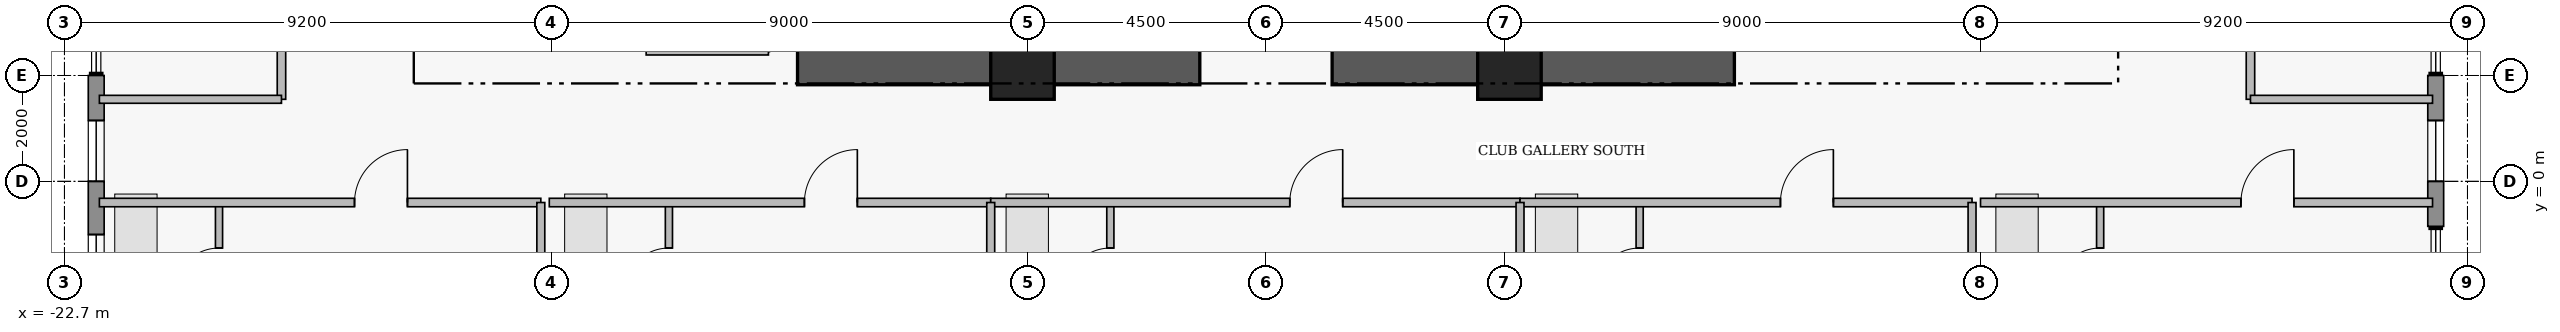
"""IFC4 building model, lengths in metres.
Left out: names, types, materials, properties, quantities, classifications, styles, units other than length and angle.
Written with IfcOpenShell. Run it as: python <this file> out.ifc"""

import sys

from ifc_helpers import new_model, si_unit, direction, frame, frame_2d, origin, origin_2d, place, context, subcontext, project, spatial, rectangle, extrude, element, fill, save


model = new_model("IFC4")
c1 = context("Model", 3, precision=1e-05, world=origin(), true_north=direction((0.0, 1.0)))
c2 = subcontext(c1, "Body", "Model", "MODEL_VIEW")
j1 = project(units=[si_unit("LENGTHUNIT", "METRE"), si_unit("PLANEANGLEUNIT", "RADIAN")], contexts=[c1])
p1 = place(None, origin())
s1 = spatial("IfcSite", under=j1, at=p1, CompositionType="ELEMENT")
p2 = place(p1, origin())
s2 = spatial("IfcBuilding", under=s1, at=p2, CompositionType="ELEMENT")
p3 = place(p2, frame((0.0, 0.0, 177.4)))
s3 = spatial("IfcBuildingStorey", under=s2, at=p3, CompositionType="ELEMENT", Elevation=177.4)
for number, where, z_axis, x_axis in (
    (1, (-8.85, 2.15, 0.0), (0.0, 0.0, 1.0), (1.0, 0.0, 0.0)),
    (2, (1.25, 2.15, 0.0), (0.0, 0.0, 1.0), (1.0, 0.0, 0.0)),
):
    element("IfcWall", number, at=place(p3, frame(where, z_axis=z_axis, x_axis=x_axis)), inside=s3, PredefinedType="SHEAR", context=c2, shape_type="SweptSolid", body=[
        extrude(rectangle(XDim=7.6, YDim=0.65, at=frame_2d((3.8, 0.0))), origin(), (0.0, 0.0, 1.0), 3.53),
    ])
for number, where, z_axis, x_axis in (
    (3, (-4.6, 2.15, 0.0), (0.0, 0.0, 1.0), (1.0, 0.0, 0.0)),
    (4, (4.6, 2.15, 0.0), (0.0, 0.0, 1.0), (1.0, 0.0, 0.0)),
):
    element("IfcColumn", number, at=place(p3, frame(where, z_axis=z_axis, x_axis=x_axis)), inside=s3, PredefinedType="COLUMN", context=c2, shape_type="SweptSolid", body=[
        extrude(rectangle(XDim=1.2, YDim=1.2, at=origin_2d()), origin(), (0.0, 0.0, 1.0), 3.75),
    ])
p4 = place(p3, frame((-22.1, -4.2, 0.0), z_axis=(0.0, 0.0, 1.0), x_axis=(0.0, 1.0, 0.0)))
e5 = element("IfcWall", 5, at=p4, inside=s3, PredefinedType="STANDARD", context=c2, shape_type="SweptSolid", body=[
    extrude(rectangle(XDim=6.2, YDim=0.3, at=frame_2d((3.1, 0.0))), origin(), (0.0, 0.0, 1.0), 3.53),
])
p5 = place(p4, frame((2.045, 0.0, 0.95)))
e6 = element("IfcOpeningElement", 6, at=p5, cuts=e5, PredefinedType="OPENING", context=c2, shape_type="SweptSolid", body=[
    extrude(rectangle(XDim=1.15, YDim=1.55, at=frame_2d((0.575, 0.775))), frame((0.0, 0.16, 0.0), z_axis=(0.0, -1.0, 0.0), x_axis=(1.0, 0.0, 0.0)), (0.0, 0.0, 1.0), 0.32),
])
p6 = place(p4, frame((4.2, 0.0, 0.95)))
e7 = element("IfcOpeningElement", 7, at=p6, cuts=e5, PredefinedType="OPENING", context=c2, shape_type="SweptSolid", body=[
    extrude(rectangle(XDim=1.15, YDim=1.55, at=frame_2d((0.575, 0.775))), frame((0.0, 0.16, 0.0), z_axis=(0.0, -1.0, 0.0), x_axis=(1.0, 0.0, 0.0)), (0.0, 0.0, 1.0), 0.32),
])
p7 = place(p3, frame((22.1, 2.0, 0.0), z_axis=(0.0, 0.0, 1.0), x_axis=(0.0, -1.0, 0.0)))
e8 = element("IfcWall", 8, at=p7, inside=s3, PredefinedType="STANDARD", context=c2, shape_type="SweptSolid", body=[
    extrude(rectangle(XDim=2.85, YDim=0.3, at=frame_2d((1.425, 0.0))), origin(), (0.0, 0.0, 1.0), 3.53),
])
p8 = place(p7, frame((0.85, 0.0, 0.95)))
e9 = element("IfcOpeningElement", 9, at=p8, cuts=e8, PredefinedType="OPENING", context=c2, shape_type="SweptSolid", body=[
    extrude(rectangle(XDim=1.15, YDim=1.55, at=frame_2d((0.575, 0.775))), frame((0.0, 0.16, 0.0), z_axis=(0.0, -1.0, 0.0), x_axis=(1.0, 0.0, 0.0)), (0.0, 0.0, 1.0), 0.32),
])
p9 = place(p3, frame((-19.78, -2.76, 0.0), z_axis=(0.0, 0.0, 1.0), x_axis=(0.0, 1.0, 0.0)))
e10 = element("IfcWall", 10, at=p9, inside=s3, PredefinedType="PLUMBINGWALL", context=c2, shape_type="SweptSolid", body=[
    extrude(rectangle(XDim=2.36, YDim=0.135, at=frame_2d((1.18, 0.0))), origin(), (0.0, 0.0, 1.0), 3.53),
])
p10 = place(p9, frame((0.65, 0.0, 0.0)))
e11 = element("IfcOpeningElement", 11, at=p10, cuts=e10, PredefinedType="OPENING", context=c2, shape_type="SweptSolid", body=[
    extrude(rectangle(XDim=0.85, YDim=2.1, at=frame_2d((0.425, 1.05))), frame((0.0, 0.077, 0.0), z_axis=(0.0, -1.0, 0.0), x_axis=(1.0, 0.0, 0.0)), (0.0, 0.0, 1.0), 0.155),
])
p11 = place(p3, frame((-22.04, -0.4, 0.0), z_axis=(0.0, 0.0, 1.0), x_axis=(1.0, 0.0, 0.0)))
e12 = element("IfcWall", 12, at=p11, inside=s3, PredefinedType="PARTITIONING", context=c2, shape_type="SweptSolid", body=[
    extrude(rectangle(XDim=8.34, YDim=0.16, at=frame_2d((4.17, 0.0))), origin(), (0.0, 0.0, 1.0), 3.53),
])
p12 = place(p11, frame((4.82, 0.0, 0.0)))
e13 = element("IfcOpeningElement", 13, at=p12, cuts=e12, PredefinedType="OPENING", context=c2, shape_type="SweptSolid", body=[
    extrude(rectangle(XDim=1.0, YDim=2.15, at=frame_2d((0.5, 1.075))), frame((0.0, 0.09, 0.0), z_axis=(0.0, -1.0, 0.0), x_axis=(1.0, 0.0, 0.0)), (0.0, 0.0, 1.0), 0.18),
])
p13 = place(p3, frame((-11.28, -2.76, 0.0), z_axis=(0.0, 0.0, 1.0), x_axis=(0.0, 1.0, 0.0)))
e14 = element("IfcWall", 14, at=p13, inside=s3, PredefinedType="PLUMBINGWALL", context=c2, shape_type="SweptSolid", body=[
    extrude(rectangle(XDim=2.36, YDim=0.135, at=frame_2d((1.18, 0.0))), origin(), (0.0, 0.0, 1.0), 3.53),
])
p14 = place(p13, frame((0.65, 0.0, 0.0)))
e15 = element("IfcOpeningElement", 15, at=p14, cuts=e14, PredefinedType="OPENING", context=c2, shape_type="SweptSolid", body=[
    extrude(rectangle(XDim=0.85, YDim=2.1, at=frame_2d((0.425, 1.05))), frame((0.0, 0.077, 0.0), z_axis=(0.0, -1.0, 0.0), x_axis=(1.0, 0.0, 0.0)), (0.0, 0.0, 1.0), 0.155),
])
p15 = place(p3, frame((-13.54, -0.4, 0.0), z_axis=(0.0, 0.0, 1.0), x_axis=(1.0, 0.0, 0.0)))
e16 = element("IfcWall", 16, at=p15, inside=s3, PredefinedType="PARTITIONING", context=c2, shape_type="SweptSolid", body=[
    extrude(rectangle(XDim=8.34, YDim=0.16, at=frame_2d((4.17, 0.0))), origin(), (0.0, 0.0, 1.0), 3.53),
])
p16 = place(p15, frame((4.82, 0.0, 0.0)))
e17 = element("IfcOpeningElement", 17, at=p16, cuts=e16, PredefinedType="OPENING", context=c2, shape_type="SweptSolid", body=[
    extrude(rectangle(XDim=1.0, YDim=2.15, at=frame_2d((0.5, 1.075))), frame((0.0, 0.09, 0.0), z_axis=(0.0, -1.0, 0.0), x_axis=(1.0, 0.0, 0.0)), (0.0, 0.0, 1.0), 0.18),
])
p17 = place(p3, frame((-2.94, -2.76, 0.0), z_axis=(0.0, 0.0, 1.0), x_axis=(0.0, 1.0, 0.0)))
e18 = element("IfcWall", 18, at=p17, inside=s3, PredefinedType="PLUMBINGWALL", context=c2, shape_type="SweptSolid", body=[
    extrude(rectangle(XDim=2.36, YDim=0.135, at=frame_2d((1.18, 0.0))), origin(), (0.0, 0.0, 1.0), 3.53),
])
p18 = place(p17, frame((0.65, 0.0, 0.0)))
e19 = element("IfcOpeningElement", 19, at=p18, cuts=e18, PredefinedType="OPENING", context=c2, shape_type="SweptSolid", body=[
    extrude(rectangle(XDim=0.85, YDim=2.1, at=frame_2d((0.425, 1.05))), frame((0.0, 0.077, 0.0), z_axis=(0.0, -1.0, 0.0), x_axis=(1.0, 0.0, 0.0)), (0.0, 0.0, 1.0), 0.155),
])
p19 = place(p3, frame((-5.2, -0.4, 0.0), z_axis=(0.0, 0.0, 1.0), x_axis=(1.0, 0.0, 0.0)))
e20 = element("IfcWall", 20, at=p19, inside=s3, PredefinedType="PARTITIONING", context=c2, shape_type="SweptSolid", body=[
    extrude(rectangle(XDim=10.0, YDim=0.16, at=frame_2d((5.0, 0.0))), origin(), (0.0, 0.0, 1.0), 3.53),
])
p20 = place(p19, frame((5.65, 0.0, 0.0)))
e21 = element("IfcOpeningElement", 21, at=p20, cuts=e20, PredefinedType="OPENING", context=c2, shape_type="SweptSolid", body=[
    extrude(rectangle(XDim=1.0, YDim=2.15, at=frame_2d((0.5, 1.075))), frame((0.0, 0.09, 0.0), z_axis=(0.0, -1.0, 0.0), x_axis=(1.0, 0.0, 0.0)), (0.0, 0.0, 1.0), 0.18),
])
p21 = place(p3, frame((7.06, -2.76, 0.0), z_axis=(0.0, 0.0, 1.0), x_axis=(0.0, 1.0, 0.0)))
e22 = element("IfcWall", 22, at=p21, inside=s3, PredefinedType="PLUMBINGWALL", context=c2, shape_type="SweptSolid", body=[
    extrude(rectangle(XDim=2.36, YDim=0.135, at=frame_2d((1.18, 0.0))), origin(), (0.0, 0.0, 1.0), 3.53),
])
p22 = place(p21, frame((0.65, 0.0, 0.0)))
e23 = element("IfcOpeningElement", 23, at=p22, cuts=e22, PredefinedType="OPENING", context=c2, shape_type="SweptSolid", body=[
    extrude(rectangle(XDim=0.85, YDim=2.1, at=frame_2d((0.425, 1.05))), frame((0.0, 0.077, 0.0), z_axis=(0.0, -1.0, 0.0), x_axis=(1.0, 0.0, 0.0)), (0.0, 0.0, 1.0), 0.155),
])
p23 = place(p3, frame((4.8, -0.4, 0.0), z_axis=(0.0, 0.0, 1.0), x_axis=(1.0, 0.0, 0.0)))
e24 = element("IfcWall", 24, at=p23, inside=s3, PredefinedType="PARTITIONING", context=c2, shape_type="SweptSolid", body=[
    extrude(rectangle(XDim=8.54, YDim=0.16, at=frame_2d((4.27, 0.0))), origin(), (0.0, 0.0, 1.0), 3.53),
])
p24 = place(p23, frame((4.92, 0.0, 0.0)))
e25 = element("IfcOpeningElement", 25, at=p24, cuts=e24, PredefinedType="OPENING", context=c2, shape_type="SweptSolid", body=[
    extrude(rectangle(XDim=1.0, YDim=2.15, at=frame_2d((0.5, 1.075))), frame((0.0, 0.09, 0.0), z_axis=(0.0, -1.0, 0.0), x_axis=(1.0, 0.0, 0.0)), (0.0, 0.0, 1.0), 0.18),
])
p25 = place(p3, frame((15.76, -2.76, 0.0), z_axis=(0.0, 0.0, 1.0), x_axis=(0.0, 1.0, 0.0)))
e26 = element("IfcWall", 26, at=p25, inside=s3, PredefinedType="PLUMBINGWALL", context=c2, shape_type="SweptSolid", body=[
    extrude(rectangle(XDim=2.36, YDim=0.135, at=frame_2d((1.18, 0.0))), origin(), (0.0, 0.0, 1.0), 3.53),
])
p26 = place(p25, frame((0.65, 0.0, 0.0)))
e27 = element("IfcOpeningElement", 27, at=p26, cuts=e26, PredefinedType="OPENING", context=c2, shape_type="SweptSolid", body=[
    extrude(rectangle(XDim=0.85, YDim=2.1, at=frame_2d((0.425, 1.05))), frame((0.0, 0.077, 0.0), z_axis=(0.0, -1.0, 0.0), x_axis=(1.0, 0.0, 0.0)), (0.0, 0.0, 1.0), 0.155),
])
p27 = place(p3, frame((13.5, -0.4, 0.0), z_axis=(0.0, 0.0, 1.0), x_axis=(1.0, 0.0, 0.0)))
e28 = element("IfcWall", 28, at=p27, inside=s3, PredefinedType="PARTITIONING", context=c2, shape_type="SweptSolid", body=[
    extrude(rectangle(XDim=8.54, YDim=0.16, at=frame_2d((4.27, 0.0))), origin(), (0.0, 0.0, 1.0), 3.53),
])
p28 = place(p27, frame((4.92, 0.0, 0.0)))
e29 = element("IfcOpeningElement", 29, at=p28, cuts=e28, PredefinedType="OPENING", context=c2, shape_type="SweptSolid", body=[
    extrude(rectangle(XDim=1.0, YDim=2.15, at=frame_2d((0.5, 1.075))), frame((0.0, 0.09, 0.0), z_axis=(0.0, -1.0, 0.0), x_axis=(1.0, 0.0, 0.0)), (0.0, 0.0, 1.0), 0.18),
])
p29 = place(p3, frame((18.6, 1.55, 0.0), z_axis=(0.0, 0.0, 1.0), x_axis=(0.0, 1.0, 0.0)))
e30 = element("IfcWall", 30, at=p29, inside=s3, PredefinedType="PARTITIONING", context=c2, shape_type="SweptSolid", body=[
    extrude(rectangle(XDim=6.25, YDim=0.16, at=frame_2d((3.125, 0.0))), origin(), (0.0, 0.0, 1.0), 3.53),
])
p30 = place(p29, frame((2.665, 0.0, 0.0)))
e31 = element("IfcOpeningElement", 31, at=p30, cuts=e30, PredefinedType="OPENING", context=c2, shape_type="SweptSolid", body=[
    extrude(rectangle(XDim=0.92, YDim=2.12, at=frame_2d((0.46, 1.06))), frame((0.0, 0.09, 0.0), z_axis=(0.0, -1.0, 0.0), x_axis=(1.0, 0.0, 0.0)), (0.0, 0.0, 1.0), 0.18),
])
p31 = place(p3, frame((-18.6, 1.55, 0.0), z_axis=(0.0, 0.0, 1.0), x_axis=(0.0, 1.0, 0.0)))
e32 = element("IfcWall", 32, at=p31, inside=s3, PredefinedType="PARTITIONING", context=c2, shape_type="SweptSolid", body=[
    extrude(rectangle(XDim=13.3, YDim=0.16, at=frame_2d((6.65, 0.0))), origin(), (0.0, 0.0, 1.0), 3.53),
])
p32 = place(p31, frame((6.175, 0.0, 0.0)))
e33 = element("IfcOpeningElement", 33, at=p32, cuts=e32, PredefinedType="OPENING", context=c2, shape_type="SweptSolid", body=[
    extrude(rectangle(XDim=0.95, YDim=2.15, at=frame_2d((0.475, 1.075))), frame((0.0, 0.09, 0.0), z_axis=(0.0, -1.0, 0.0), x_axis=(1.0, 0.0, 0.0)), (0.0, 0.0, 1.0), 0.18),
])
p33 = place(p3, frame((-11.71, 2.47, 0.0), z_axis=(0.0, 0.0, 1.0), x_axis=(1.0, 0.0, 0.0)))
e34 = element("IfcWall", 34, at=p33, inside=s3, PredefinedType="PARTITIONING", context=c2, shape_type="SweptSolid", body=[
    extrude(rectangle(XDim=2.31, YDim=0.165, at=frame_2d((1.155, 0.0))), origin(), (0.0, 0.0, 1.0), 2.43),
])
p34 = place(p3, frame((-13.7, -7.52, 0.0), z_axis=(0.0, 0.0, 1.0), x_axis=(0.0, 1.0, 0.0)))
e35 = element("IfcWall", 35, at=p34, inside=s3, PredefinedType="PARTITIONING", context=c2, shape_type="SweptSolid", body=[
    extrude(rectangle(XDim=7.12, YDim=0.15, at=frame_2d((3.56, 0.0))), origin(), (0.0, 0.0, 1.0), 2.923),
])
p35 = place(p3, frame((-5.2, -7.52, 0.0), z_axis=(0.0, 0.0, 1.0), x_axis=(0.0, 1.0, 0.0)))
e36 = element("IfcWall", 36, at=p35, inside=s3, PredefinedType="PARTITIONING", context=c2, shape_type="SweptSolid", body=[
    extrude(rectangle(XDim=7.12, YDim=0.15, at=frame_2d((3.56, 0.0))), origin(), (0.0, 0.0, 1.0), 3.53),
])
for number, where, z_axis, x_axis in (
    (37, (4.8, -7.52, 0.0), (0.0, 0.0, 1.0), (0.0, 1.0, 0.0)),
    (38, (13.34, -7.52, 0.0), (0.0, 0.0, 1.0), (0.0, 1.0, 0.0)),
):
    element("IfcWall", number, at=place(p3, frame(where, z_axis=z_axis, x_axis=x_axis)), inside=s3, PredefinedType="PARTITIONING", context=c2, shape_type="SweptSolid", body=[
        extrude(rectangle(XDim=7.12, YDim=0.15, at=frame_2d((3.56, 0.0))), origin(), (0.0, 0.0, 1.0), 2.923),
    ])
for number, where, z_axis, x_axis in (
    (39, (18.6, 1.55, 0.0), (0.0, 0.0, 1.0), (1.0, 0.0, 0.0)),
    (40, (-22.04, 1.55, 0.0), (0.0, 0.0, 1.0), (1.0, 0.0, 0.0)),
):
    element("IfcWall", number, at=place(p3, frame(where, z_axis=z_axis, x_axis=x_axis)), inside=s3, PredefinedType="PARTITIONING", context=c2, shape_type="SweptSolid", body=[
        extrude(rectangle(XDim=3.44, YDim=0.15, at=frame_2d((1.72, 0.0))), origin(), (0.0, 0.0, 1.0), 3.53),
    ])
p36 = place(p5, origin())
e41 = element("IfcWindow", 41, at=p36, inside=s3, PartitioningType="SINGLE_PANEL", PredefinedType="WINDOW", context=c2, shape_type="SweptSolid", body=[
    extrude(rectangle(XDim=1.15, YDim=1.55, at=frame_2d((0.575, 0.775))), frame((0.0, 0.03, 0.0), z_axis=(0.0, -1.0, 0.0), x_axis=(1.0, 0.0, 0.0)), (0.0, 0.0, 1.0), 0.06),
])
fill(e6, e41)
p37 = place(p6, origin())
e42 = element("IfcWindow", 42, at=p37, inside=s3, PartitioningType="SINGLE_PANEL", PredefinedType="WINDOW", context=c2, shape_type="SweptSolid", body=[
    extrude(rectangle(XDim=1.15, YDim=1.55, at=frame_2d((0.575, 0.775))), frame((0.0, 0.03, 0.0), z_axis=(0.0, -1.0, 0.0), x_axis=(1.0, 0.0, 0.0)), (0.0, 0.0, 1.0), 0.06),
])
fill(e7, e42)
p38 = place(p8, origin())
e43 = element("IfcWindow", 43, at=p38, inside=s3, PartitioningType="SINGLE_PANEL", PredefinedType="WINDOW", context=c2, shape_type="SweptSolid", body=[
    extrude(rectangle(XDim=1.15, YDim=1.55, at=frame_2d((0.575, 0.775))), frame((0.0, 0.03, 0.0), z_axis=(0.0, -1.0, 0.0), x_axis=(1.0, 0.0, 0.0)), (0.0, 0.0, 1.0), 0.06),
])
fill(e9, e43)
p39 = place(p10, origin())
e44 = element("IfcDoor", 44, at=p39, inside=s3, OperationType="SINGLE_SWING_LEFT", PredefinedType="DOOR", context=c2, shape_type="SweptSolid", body=[
    extrude(rectangle(XDim=0.85, YDim=2.1, at=frame_2d((0.425, 1.05))), frame((0.0, 0.025, 0.0), z_axis=(0.0, -1.0, 0.0), x_axis=(1.0, 0.0, 0.0)), (0.0, 0.0, 1.0), 0.05),
])
fill(e11, e44)
p40 = place(p12, origin())
e45 = element("IfcDoor", 45, at=p40, inside=s3, OperationType="SINGLE_SWING_RIGHT", PredefinedType="DOOR", context=c2, shape_type="SweptSolid", body=[
    extrude(rectangle(XDim=1.0, YDim=2.15, at=frame_2d((0.5, 1.075))), frame((0.0, 0.025, 0.0), z_axis=(0.0, -1.0, 0.0), x_axis=(1.0, 0.0, 0.0)), (0.0, 0.0, 1.0), 0.05),
])
fill(e13, e45)
p41 = place(p14, origin())
e46 = element("IfcDoor", 46, at=p41, inside=s3, OperationType="SINGLE_SWING_LEFT", PredefinedType="DOOR", context=c2, shape_type="SweptSolid", body=[
    extrude(rectangle(XDim=0.85, YDim=2.1, at=frame_2d((0.425, 1.05))), frame((0.0, 0.025, 0.0), z_axis=(0.0, -1.0, 0.0), x_axis=(1.0, 0.0, 0.0)), (0.0, 0.0, 1.0), 0.05),
])
fill(e15, e46)
p42 = place(p16, origin())
e47 = element("IfcDoor", 47, at=p42, inside=s3, OperationType="SINGLE_SWING_RIGHT", PredefinedType="DOOR", context=c2, shape_type="SweptSolid", body=[
    extrude(rectangle(XDim=1.0, YDim=2.15, at=frame_2d((0.5, 1.075))), frame((0.0, 0.025, 0.0), z_axis=(0.0, -1.0, 0.0), x_axis=(1.0, 0.0, 0.0)), (0.0, 0.0, 1.0), 0.05),
])
fill(e17, e47)
p43 = place(p18, origin())
e48 = element("IfcDoor", 48, at=p43, inside=s3, OperationType="SINGLE_SWING_LEFT", PredefinedType="DOOR", context=c2, shape_type="SweptSolid", body=[
    extrude(rectangle(XDim=0.85, YDim=2.1, at=frame_2d((0.425, 1.05))), frame((0.0, 0.025, 0.0), z_axis=(0.0, -1.0, 0.0), x_axis=(1.0, 0.0, 0.0)), (0.0, 0.0, 1.0), 0.05),
])
fill(e19, e48)
p44 = place(p20, origin())
e49 = element("IfcDoor", 49, at=p44, inside=s3, OperationType="SINGLE_SWING_RIGHT", PredefinedType="DOOR", context=c2, shape_type="SweptSolid", body=[
    extrude(rectangle(XDim=1.0, YDim=2.15, at=frame_2d((0.5, 1.075))), frame((0.0, 0.025, 0.0), z_axis=(0.0, -1.0, 0.0), x_axis=(1.0, 0.0, 0.0)), (0.0, 0.0, 1.0), 0.05),
])
fill(e21, e49)
p45 = place(p22, origin())
e50 = element("IfcDoor", 50, at=p45, inside=s3, OperationType="SINGLE_SWING_LEFT", PredefinedType="DOOR", context=c2, shape_type="SweptSolid", body=[
    extrude(rectangle(XDim=0.85, YDim=2.1, at=frame_2d((0.425, 1.05))), frame((0.0, 0.025, 0.0), z_axis=(0.0, -1.0, 0.0), x_axis=(1.0, 0.0, 0.0)), (0.0, 0.0, 1.0), 0.05),
])
fill(e23, e50)
p46 = place(p24, origin())
e51 = element("IfcDoor", 51, at=p46, inside=s3, OperationType="SINGLE_SWING_RIGHT", PredefinedType="DOOR", context=c2, shape_type="SweptSolid", body=[
    extrude(rectangle(XDim=1.0, YDim=2.15, at=frame_2d((0.5, 1.075))), frame((0.0, 0.025, 0.0), z_axis=(0.0, -1.0, 0.0), x_axis=(1.0, 0.0, 0.0)), (0.0, 0.0, 1.0), 0.05),
])
fill(e25, e51)
p47 = place(p26, origin())
e52 = element("IfcDoor", 52, at=p47, inside=s3, OperationType="SINGLE_SWING_LEFT", PredefinedType="DOOR", context=c2, shape_type="SweptSolid", body=[
    extrude(rectangle(XDim=0.85, YDim=2.1, at=frame_2d((0.425, 1.05))), frame((0.0, 0.025, 0.0), z_axis=(0.0, -1.0, 0.0), x_axis=(1.0, 0.0, 0.0)), (0.0, 0.0, 1.0), 0.05),
])
fill(e27, e52)
p48 = place(p28, origin())
e53 = element("IfcDoor", 53, at=p48, inside=s3, OperationType="SINGLE_SWING_RIGHT", PredefinedType="DOOR", context=c2, shape_type="SweptSolid", body=[
    extrude(rectangle(XDim=1.0, YDim=2.15, at=frame_2d((0.5, 1.075))), frame((0.0, 0.025, 0.0), z_axis=(0.0, -1.0, 0.0), x_axis=(1.0, 0.0, 0.0)), (0.0, 0.0, 1.0), 0.05),
])
fill(e29, e53)
save(model, sys.argv[1])
